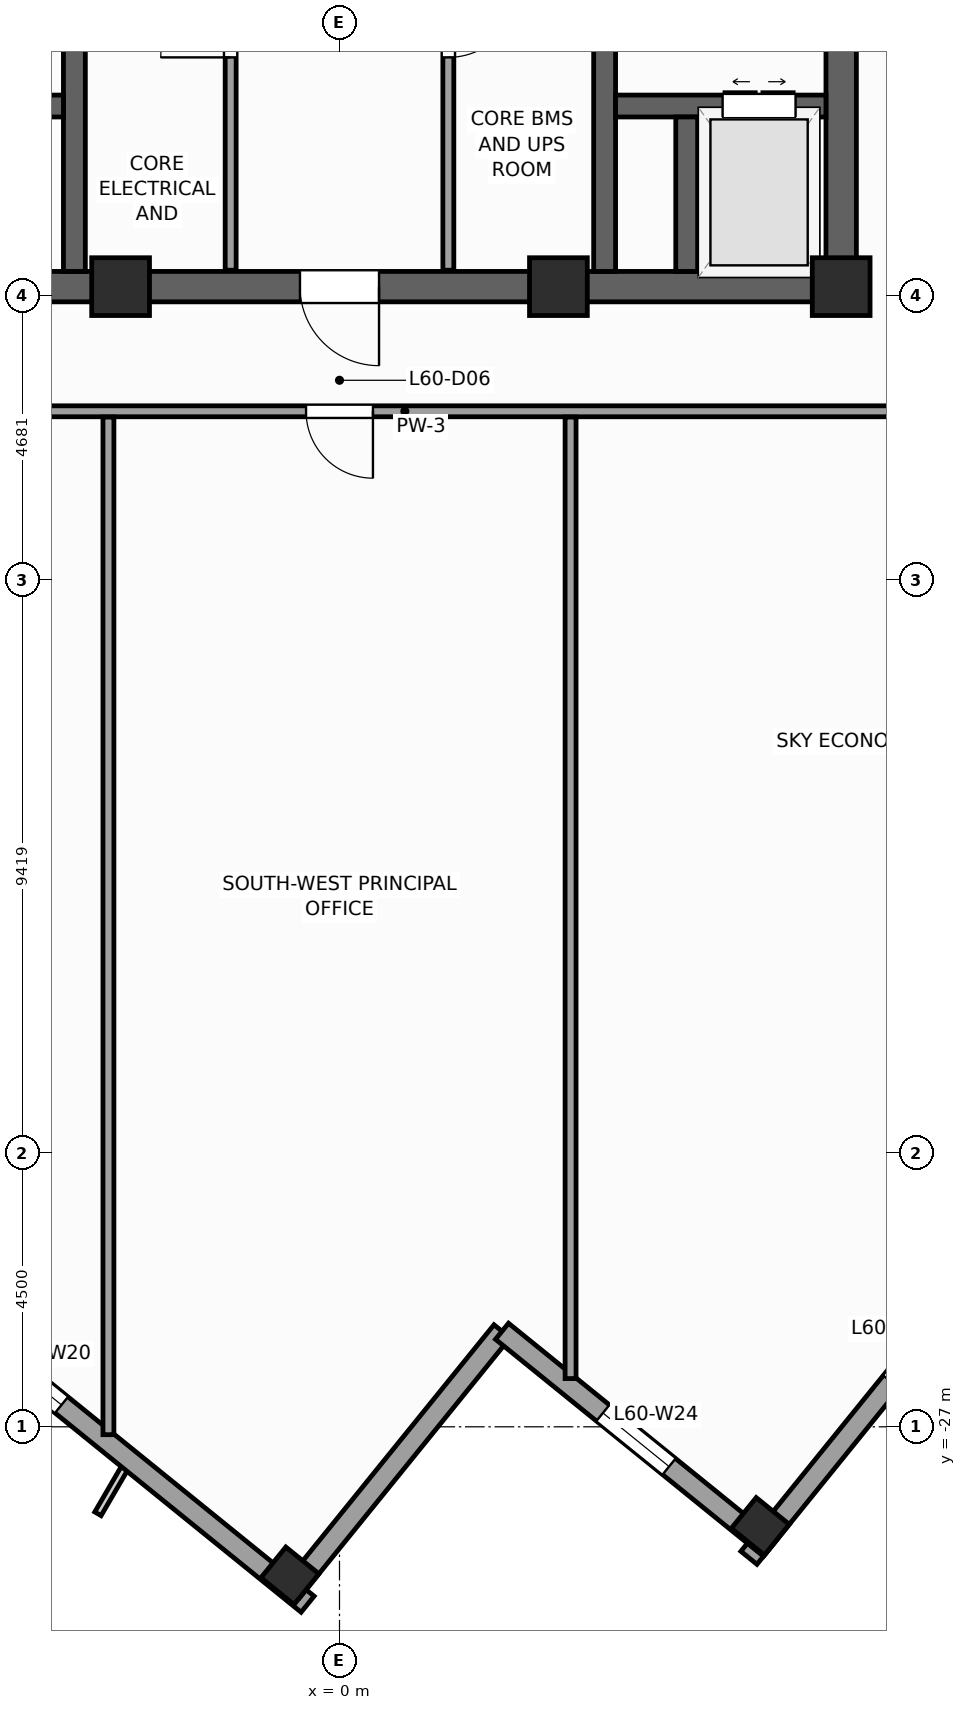
"""IFC4 building model, lengths in metres.
Left out: names, types, materials, properties, quantities, classifications, styles, units other than length and angle.
Written with IfcOpenShell. Run it as: python <this file> out.ifc"""

import sys

from ifc_helpers import new_model, si_unit, direction, frame, frame_2d, origin, origin_2d, place, context, subcontext, project, spatial, rectangle, extrude, source, transform, mapped, element, fill, save


model = new_model("IFC4")
c1 = context("Model", 3, precision=1e-05, world=origin(), true_north=direction((0.0, 1.0)))
c2 = subcontext(c1, "Body", "Model", "MODEL_VIEW")
j1 = project(units=[si_unit("LENGTHUNIT", "METRE"), si_unit("PLANEANGLEUNIT", "RADIAN")], contexts=[c1])
p1 = place(None, origin())
s1 = spatial("IfcSite", under=j1, at=p1, CompositionType="ELEMENT")
p2 = place(p1, origin())
s2 = spatial("IfcBuilding", under=s1, at=p2, CompositionType="ELEMENT")
p3 = place(p2, frame((0.0, 0.0, 248.5)))
s3 = spatial("IfcBuildingStorey", under=s2, at=p3, CompositionType="ELEMENT", Elevation=248.5)
p4 = place(p3, frame((-8.5, -8.25, 0.0), z_axis=(0.0, 0.0, 1.0), x_axis=(1.0, 0.0, 0.0)))
e1 = element("IfcWall", 1, at=p4, inside=s3, PredefinedType="SHEAR", context=c2, shape_type="SweptSolid", body=[
    extrude(rectangle(XDim=17.0, YDim=0.5, at=frame_2d((8.5, 0.0))), origin(), (0.0, 0.0, 1.0), 3.9),
])
p5 = place(p4, frame((7.85, 0.0, 0.0)))
e2 = element("IfcOpeningElement", 2, at=p5, cuts=e1, PredefinedType="OPENING", context=c2, shape_type="SweptSolid", body=[
    extrude(rectangle(XDim=1.3, YDim=2.2, at=frame_2d((0.65, 1.1))), frame((0.0, 0.26, 0.0), z_axis=(0.0, -1.0, 0.0), x_axis=(1.0, 0.0, 0.0)), (0.0, 0.0, 1.0), 0.52),
])
p6 = place(p3, frame((8.25, -8.0, 0.0), z_axis=(0.0, 0.0, 1.0), x_axis=(0.0, 1.0, 0.0)))
e3 = element("IfcWall", 3, at=p6, inside=s3, PredefinedType="SHEAR", context=c2, shape_type="SweptSolid", body=[
    extrude(rectangle(XDim=16.0, YDim=0.5, at=frame_2d((8.0, 0.0))), origin(), (0.0, 0.0, 1.0), 3.9),
])
p7 = place(p6, frame((4.69, 0.0, 0.0)))
e4 = element("IfcOpeningElement", 4, at=p7, cuts=e3, PredefinedType="OPENING", context=c2, shape_type="SweptSolid", body=[
    extrude(rectangle(XDim=1.3, YDim=2.2, at=frame_2d((0.65, 1.1))), frame((0.0, 0.26, 0.0), z_axis=(0.0, -1.0, 0.0), x_axis=(1.0, 0.0, 0.0)), (0.0, 0.0, 1.0), 0.52),
])
for number, where, z_axis, x_axis in (
    (5, (-4.36, -8.0, 0.0), (0.0, 0.0, 1.0), (0.0, 1.0, 0.0)),
    (6, (4.36, -8.0, 0.0), (0.0, 0.0, 1.0), (0.0, 1.0, 0.0)),
):
    element("IfcWall", number, at=place(p3, frame(where, z_axis=z_axis, x_axis=x_axis)), inside=s3, PredefinedType="SHEAR", context=c2, shape_type="SweptSolid", body=[
        extrude(rectangle(XDim=16.0, YDim=0.36, at=frame_2d((8.0, 0.0))), origin(), (0.0, 0.0, 1.0), 3.9),
    ])
p8 = place(p3, frame((-8.0, -5.28, 0.0), z_axis=(0.0, 0.0, 1.0), x_axis=(1.0, 0.0, 0.0)))
e7 = element("IfcWall", 7, at=p8, inside=s3, PredefinedType="SHEAR", context=c2, shape_type="SweptSolid", body=[
    extrude(rectangle(XDim=3.46, YDim=0.36, at=frame_2d((1.73, 0.0))), origin(), (0.0, 0.0, 1.0), 3.9),
])
p9 = place(p8, frame((0.5, 0.0, 0.0)))
e8 = element("IfcOpeningElement", 8, at=p9, cuts=e7, PredefinedType="OPENING", context=c2, shape_type="SweptSolid", body=[
    extrude(rectangle(XDim=1.2, YDim=2.25, at=frame_2d((0.6, 1.125))), frame((0.0, 0.19, 0.0), z_axis=(0.0, -1.0, 0.0), x_axis=(1.0, 0.0, 0.0)), (0.0, 0.0, 1.0), 0.38),
])
p10 = place(p3, frame((4.54, -5.28, 0.0), z_axis=(0.0, 0.0, 1.0), x_axis=(1.0, 0.0, 0.0)))
e9 = element("IfcWall", 9, at=p10, inside=s3, PredefinedType="SHEAR", context=c2, shape_type="SweptSolid", body=[
    extrude(rectangle(XDim=3.46, YDim=0.36, at=frame_2d((1.73, 0.0))), origin(), (0.0, 0.0, 1.0), 3.9),
])
p11 = place(p10, frame((1.76, 0.0, 0.0)))
e10 = element("IfcOpeningElement", 10, at=p11, cuts=e9, PredefinedType="OPENING", context=c2, shape_type="SweptSolid", body=[
    extrude(rectangle(XDim=1.2, YDim=2.25, at=frame_2d((0.6, 1.125))), frame((0.0, 0.19, 0.0), z_axis=(0.0, -1.0, 0.0), x_axis=(1.0, 0.0, 0.0)), (0.0, 0.0, 1.0), 0.38),
])
p12 = place(p3, frame((5.71, -8.0, 0.0), z_axis=(0.0, 0.0, 1.0), x_axis=(0.0, 1.0, 0.0)))
e11 = element("IfcWall", 11, at=p12, inside=s3, PredefinedType="SHEAR", context=c2, shape_type="SweptSolid", body=[
    extrude(rectangle(XDim=2.54, YDim=0.36, at=frame_2d((1.27, 0.0))), origin(), (0.0, 0.0, 1.0), 3.9),
])
m1 = source(origin(), c2, "Body", "SweptSolid", [
    extrude(rectangle(XDim=0.95, YDim=0.95, at=origin_2d()), origin(), (0.0, 0.0, 1.0), 3.9),
])
for number, where, z_axis, x_axis in (
    (12, (8.25, -8.25, 0.0), (0.0, 0.0, 1.0), (1.0, 0.0, 0.0)),
    (13, (-3.6, -8.25, 0.0), (0.0, 0.0, 1.0), (1.0, 0.0, 0.0)),
    (14, (3.6, -8.25, 0.0), (0.0, 0.0, 1.0), (1.0, 0.0, 0.0)),
):
    element("IfcColumn", number, at=place(p3, frame(where, z_axis=z_axis, x_axis=x_axis)), inside=s3, PredefinedType="PILASTER", context=c2, shape_type="MappedRepresentation", body=[
        mapped(m1, transform((0.0, 0.0, 0.0), scale=1.0)),
    ])
m2 = source(origin(), c2, "Body", "SweptSolid", [
    extrude(rectangle(XDim=0.65, YDim=0.7, at=origin_2d()), origin(), (0.0, 0.0, 1.0), 3.9),
])
for number, where, z_axis, x_axis in (
    (15, (6.92, -28.637, 0.0), (0.0, 0.0, 1.0), (0.629, 0.777, 0.0)),
    (16, (-0.815, -29.45, 0.0), (0.0, 0.0, 1.0), (0.629, 0.777, 0.0)),
):
    element("IfcColumn", number, at=place(p3, frame(where, z_axis=z_axis, x_axis=x_axis)), inside=s3, PredefinedType="COLUMN", context=c2, shape_type="MappedRepresentation", body=[
        mapped(m2, transform((0.0, 0.0, 0.0), scale=1.0)),
    ])
p13 = place(p3, frame((6.733, -29.154, 0.0), z_axis=(0.0, 0.0, 1.0), x_axis=(0.629325378072, 0.77714192302, 0.0)))
e17 = element("IfcWall", 17, at=p13, inside=s3, PredefinedType="STANDARD", context=c2, shape_type="SweptSolid", body=[
    extrude(rectangle(XDim=36.84, YDim=0.34, at=frame_2d((18.42, 0.0))), origin(), (0.0, 0.0, 1.0), 2.96),
])
p14 = place(p13, frame((12.295, 0.0, 0.0)))
e18 = element("IfcOpeningElement", 18, at=p14, cuts=e17, PredefinedType="OPENING", context=c2, shape_type="SweptSolid", body=[
    extrude(rectangle(XDim=1.05, YDim=2.25, at=frame_2d((0.525, 1.125))), frame((0.0, 0.18, 0.0), z_axis=(0.0, -1.0, 0.0), x_axis=(1.0, 0.0, 0.0)), (0.0, 0.0, 1.0), 0.36),
])
p15 = place(p13, frame((3.721, 0.0, 0.48)))
e19 = element("IfcOpeningElement", 19, at=p15, cuts=e17, PredefinedType="OPENING", context=c2, shape_type="SweptSolid", body=[
    extrude(rectangle(XDim=1.4, YDim=2.4, at=frame_2d((0.7, 1.2))), frame((0.0, 0.18, 0.0), z_axis=(0.0, -1.0, 0.0), x_axis=(1.0, 0.0, 0.0)), (0.0, 0.0, 1.0), 0.36),
])
p16 = place(p13, frame((9.059, 0.0, 0.58)))
e20 = element("IfcOpeningElement", 20, at=p16, cuts=e17, PredefinedType="OPENING", context=c2, shape_type="SweptSolid", body=[
    extrude(rectangle(XDim=1.75, YDim=2.3, at=frame_2d((0.875, 1.15))), frame((0.0, 0.18, 0.0), z_axis=(0.0, -1.0, 0.0), x_axis=(1.0, 0.0, 0.0)), (0.0, 0.0, 1.0), 0.36),
])
p17 = place(p13, frame((16.058, 0.0, 0.58)))
e21 = element("IfcOpeningElement", 21, at=p17, cuts=e17, PredefinedType="OPENING", context=c2, shape_type="SweptSolid", body=[
    extrude(rectangle(XDim=1.75, YDim=2.3, at=frame_2d((0.875, 1.15))), frame((0.0, 0.18, 0.0), z_axis=(0.0, -1.0, 0.0), x_axis=(1.0, 0.0, 0.0)), (0.0, 0.0, 1.0), 0.36),
])
p18 = place(p13, frame((24.176, 0.0, 0.58)))
e22 = element("IfcOpeningElement", 22, at=p18, cuts=e17, PredefinedType="OPENING", context=c2, shape_type="SweptSolid", body=[
    extrude(rectangle(XDim=1.75, YDim=2.3, at=frame_2d((0.875, 1.15))), frame((0.0, 0.18, 0.0), z_axis=(0.0, -1.0, 0.0), x_axis=(1.0, 0.0, 0.0)), (0.0, 0.0, 1.0), 0.36),
])
p19 = place(p13, frame((30.982, 0.0, 0.48)))
e23 = element("IfcOpeningElement", 23, at=p19, cuts=e17, PredefinedType="OPENING", context=c2, shape_type="SweptSolid", body=[
    extrude(rectangle(XDim=1.4, YDim=2.4, at=frame_2d((0.7, 1.2))), frame((0.0, 0.18, 0.0), z_axis=(0.0, -1.0, 0.0), x_axis=(1.0, 0.0, 0.0)), (0.0, 0.0, 1.0), 0.36),
])
p20 = place(p3, frame((-29.154, -6.733, 0.0), z_axis=(0.0, 0.0, 1.0), x_axis=(0.77714192302, -0.629325378072, 0.0)))
e24 = element("IfcWall", 24, at=p20, inside=s3, PredefinedType="STANDARD", context=c2, shape_type="SweptSolid", body=[
    extrude(rectangle(XDim=36.84, YDim=0.34, at=frame_2d((18.42, 0.0))), origin(), (0.0, 0.0, 1.0), 2.96),
])
p21 = place(p20, frame((3.721, 0.0, 0.48)))
e25 = element("IfcOpeningElement", 25, at=p21, cuts=e24, PredefinedType="OPENING", context=c2, shape_type="SweptSolid", body=[
    extrude(rectangle(XDim=1.4, YDim=2.4, at=frame_2d((0.7, 1.2))), frame((0.0, 0.18, 0.0), z_axis=(0.0, -1.0, 0.0), x_axis=(1.0, 0.0, 0.0)), (0.0, 0.0, 1.0), 0.36),
])
p22 = place(p20, frame((9.809, 0.0, 0.58)))
e26 = element("IfcOpeningElement", 26, at=p22, cuts=e24, PredefinedType="OPENING", context=c2, shape_type="SweptSolid", body=[
    extrude(rectangle(XDim=1.75, YDim=2.3, at=frame_2d((0.875, 1.15))), frame((0.0, 0.18, 0.0), z_axis=(0.0, -1.0, 0.0), x_axis=(1.0, 0.0, 0.0)), (0.0, 0.0, 1.0), 0.36),
])
p23 = place(p20, frame((16.058, 0.0, 0.58)))
e27 = element("IfcOpeningElement", 27, at=p23, cuts=e24, PredefinedType="OPENING", context=c2, shape_type="SweptSolid", body=[
    extrude(rectangle(XDim=1.75, YDim=2.3, at=frame_2d((0.875, 1.15))), frame((0.0, 0.18, 0.0), z_axis=(0.0, -1.0, 0.0), x_axis=(1.0, 0.0, 0.0)), (0.0, 0.0, 1.0), 0.36),
])
p24 = place(p20, frame((24.176, 0.0, 0.58)))
e28 = element("IfcOpeningElement", 28, at=p24, cuts=e24, PredefinedType="OPENING", context=c2, shape_type="SweptSolid", body=[
    extrude(rectangle(XDim=1.75, YDim=2.3, at=frame_2d((0.875, 1.15))), frame((0.0, 0.18, 0.0), z_axis=(0.0, -1.0, 0.0), x_axis=(1.0, 0.0, 0.0)), (0.0, 0.0, 1.0), 0.36),
])
p25 = place(p20, frame((30.232, 0.0, 0.48)))
e29 = element("IfcOpeningElement", 29, at=p25, cuts=e24, PredefinedType="OPENING", context=c2, shape_type="SweptSolid", body=[
    extrude(rectangle(XDim=1.4, YDim=2.4, at=frame_2d((0.7, 1.2))), frame((0.0, 0.18, 0.0), z_axis=(0.0, -1.0, 0.0), x_axis=(1.0, 0.0, 0.0)), (0.0, 0.0, 1.0), 0.36),
])
p26 = place(p3, frame((-0.789, -29.703, 0.0), z_axis=(0.0, 0.0, 1.0), x_axis=(0.629323365087, 0.77714355312, 0.0)))
e30 = element("IfcWall", 30, at=p26, inside=s3, PredefinedType="STANDARD", context=c2, shape_type="SweptSolid", body=[
    extrude(rectangle(XDim=5.5, YDim=0.34, at=frame_2d((2.75, 0.0))), origin(), (0.0, 0.0, 1.0), 3.66),
])
p27 = place(p3, frame((2.673, -25.429, 0.0), z_axis=(0.0, 0.0, 1.0), x_axis=(0.777162640055, -0.629299794138, 0.0)))
e31 = element("IfcWall", 31, at=p27, inside=s3, PredefinedType="STANDARD", context=c2, shape_type="SweptSolid", body=[
    extrude(rectangle(XDim=5.67, YDim=0.34, at=frame_2d((2.835, 0.0))), origin(), (0.0, 0.0, 1.0), 3.66),
])
p28 = place(p27, frame((2.135, 0.0, 0.48)))
e32 = element("IfcOpeningElement", 32, at=p28, cuts=e31, PredefinedType="OPENING", context=c2, shape_type="SweptSolid", body=[
    extrude(rectangle(XDim=1.4, YDim=2.4, at=frame_2d((0.7, 1.2))), frame((0.0, 0.18, 0.0), z_axis=(0.0, -1.0, 0.0), x_axis=(1.0, 0.0, 0.0)), (0.0, 0.0, 1.0), 0.36),
])
p29 = place(p3, frame((-1.79, -7.98, 0.0), z_axis=(0.0, 0.0, 1.0), x_axis=(0.0, 1.0, 0.0)))
e33 = element("IfcWall", 33, at=p29, inside=s3, PredefinedType="PARTITIONING", context=c2, shape_type="SweptSolid", body=[
    extrude(rectangle(XDim=12.38, YDim=0.18, at=frame_2d((6.19, 0.0))), origin(), (0.0, 0.0, 1.0), 3.66),
])
p30 = place(p29, frame((8.8, 0.0, 0.0)))
e34 = element("IfcOpeningElement", 34, at=p30, cuts=e33, PredefinedType="OPENING", context=c2, shape_type="SweptSolid", body=[
    extrude(rectangle(XDim=1.1, YDim=2.2, at=frame_2d((0.55, 1.1))), frame((0.0, 0.1, 0.0), z_axis=(0.0, -1.0, 0.0), x_axis=(1.0, 0.0, 0.0)), (0.0, 0.0, 1.0), 0.2),
])
p31 = place(p29, frame((10.86, 0.0, 0.0)))
e35 = element("IfcOpeningElement", 35, at=p31, cuts=e33, PredefinedType="OPENING", context=c2, shape_type="SweptSolid", body=[
    extrude(rectangle(XDim=1.1, YDim=2.2, at=frame_2d((0.55, 1.1))), frame((0.0, 0.1, 0.0), z_axis=(0.0, -1.0, 0.0), x_axis=(1.0, 0.0, 0.0)), (0.0, 0.0, 1.0), 0.2),
])
p32 = place(p29, frame((3.5, 0.0, 0.0)))
e36 = element("IfcOpeningElement", 36, at=p32, cuts=e33, PredefinedType="OPENING", context=c2, shape_type="SweptSolid", body=[
    extrude(rectangle(XDim=1.15, YDim=2.25, at=frame_2d((0.575, 1.125))), frame((0.0, 0.1, 0.0), z_axis=(0.0, -1.0, 0.0), x_axis=(1.0, 0.0, 0.0)), (0.0, 0.0, 1.0), 0.2),
])
p33 = place(p3, frame((1.79, -7.98, 0.0), z_axis=(0.0, 0.0, 1.0), x_axis=(0.0, 1.0, 0.0)))
e37 = element("IfcWall", 37, at=p33, inside=s3, PredefinedType="PARTITIONING", context=c2, shape_type="SweptSolid", body=[
    extrude(rectangle(XDim=12.38, YDim=0.18, at=frame_2d((6.19, 0.0))), origin(), (0.0, 0.0, 1.0), 3.66),
])
p34 = place(p33, frame((8.8, 0.0, 0.0)))
e38 = element("IfcOpeningElement", 38, at=p34, cuts=e37, PredefinedType="OPENING", context=c2, shape_type="SweptSolid", body=[
    extrude(rectangle(XDim=1.1, YDim=2.2, at=frame_2d((0.55, 1.1))), frame((0.0, 0.1, 0.0), z_axis=(0.0, -1.0, 0.0), x_axis=(1.0, 0.0, 0.0)), (0.0, 0.0, 1.0), 0.2),
])
p35 = place(p33, frame((10.86, 0.0, 0.0)))
e39 = element("IfcOpeningElement", 39, at=p35, cuts=e37, PredefinedType="OPENING", context=c2, shape_type="SweptSolid", body=[
    extrude(rectangle(XDim=1.1, YDim=2.2, at=frame_2d((0.55, 1.1))), frame((0.0, 0.1, 0.0), z_axis=(0.0, -1.0, 0.0), x_axis=(1.0, 0.0, 0.0)), (0.0, 0.0, 1.0), 0.2),
])
p36 = place(p33, frame((3.5, 0.0, 0.0)))
e40 = element("IfcOpeningElement", 40, at=p36, cuts=e37, PredefinedType="OPENING", context=c2, shape_type="SweptSolid", body=[
    extrude(rectangle(XDim=1.15, YDim=2.25, at=frame_2d((0.575, 1.125))), frame((0.0, 0.1, 0.0), z_axis=(0.0, -1.0, 0.0), x_axis=(1.0, 0.0, 0.0)), (0.0, 0.0, 1.0), 0.2),
])
p37 = place(p3, frame((-10.3, -10.3, 0.0), z_axis=(0.0, 0.0, 1.0), x_axis=(1.0, 0.0, 0.0)))
e41 = element("IfcWall", 41, at=p37, inside=s3, PredefinedType="PARTITIONING", context=c2, shape_type="SweptSolid", body=[
    extrude(rectangle(XDim=22.75, YDim=0.18, at=frame_2d((11.375, 0.0))), origin(), (0.0, 0.0, 1.0), 3.66),
])
p38 = place(p37, frame((9.75, 0.0, 0.0)))
e42 = element("IfcOpeningElement", 42, at=p38, cuts=e41, PredefinedType="OPENING", context=c2, shape_type="SweptSolid", body=[
    extrude(rectangle(XDim=1.1, YDim=2.2, at=frame_2d((0.55, 1.1))), frame((0.0, 0.1, 0.0), z_axis=(0.0, -1.0, 0.0), x_axis=(1.0, 0.0, 0.0)), (0.0, 0.0, 1.0), 0.2),
])
p39 = place(p37, frame((2.865, 0.0, 0.0)))
e43 = element("IfcOpeningElement", 43, at=p39, cuts=e41, PredefinedType="OPENING", context=c2, shape_type="SweptSolid", body=[
    extrude(rectangle(XDim=1.1, YDim=2.2, at=frame_2d((0.55, 1.1))), frame((0.0, 0.1, 0.0), z_axis=(0.0, -1.0, 0.0), x_axis=(1.0, 0.0, 0.0)), (0.0, 0.0, 1.0), 0.2),
])
p40 = place(p3, frame((3.8, -10.395, 0.0), z_axis=(0.0, 0.0, 1.0), x_axis=(0.0, -1.0, 0.0)))
e44 = element("IfcWall", 44, at=p40, inside=s3, PredefinedType="PARTITIONING", context=c2, shape_type="SweptSolid", body=[
    extrude(rectangle(XDim=15.812, YDim=0.18, at=frame_2d((7.906, 0.0))), origin(), (0.0, 0.0, 1.0), 3.66),
])
p41 = place(p3, frame((-3.8, -10.395, 0.0), z_axis=(0.0, 0.0, 1.0), x_axis=(0.0, -1.0, 0.0)))
e45 = element("IfcWall", 45, at=p41, inside=s3, PredefinedType="PARTITIONING", context=c2, shape_type="SweptSolid", body=[
    extrude(rectangle(XDim=16.734, YDim=0.18, at=frame_2d((8.367, 0.0))), origin(), (0.0, 0.0, 1.0), 3.66),
])
m3 = source(origin(), c2, "Body", "SweptSolid", [
    extrude(rectangle(XDim=1.4, YDim=2.4, at=frame_2d((0.7, 1.2))), frame((0.0, 0.03, 0.0), z_axis=(0.0, -1.0, 0.0), x_axis=(1.0, 0.0, 0.0)), (0.0, 0.0, 1.0), 0.06),
])
p42 = place(p25, origin())
e46 = element("IfcWindow", 46, at=p42, inside=s3, PartitioningType="SINGLE_PANEL", PredefinedType="WINDOW", context=c2, shape_type="MappedRepresentation", body=[
    mapped(m3, transform((0.0, 0.0, 0.0), scale=1.0)),
])
fill(e29, e46)
p43 = place(p28, origin())
e47 = element("IfcWindow", 47, at=p43, inside=s3, PartitioningType="SINGLE_PANEL", PredefinedType="WINDOW", context=c2, shape_type="MappedRepresentation", body=[
    mapped(m3, transform((0.0, 0.0, 0.0), scale=1.0)),
])
fill(e32, e47)
m4 = source(origin(), c2, "Body", "SweptSolid", [
    extrude(rectangle(XDim=1.3, YDim=2.2, at=frame_2d((0.65, 1.1))), frame((0.0, 0.025, 0.0), z_axis=(0.0, -1.0, 0.0), x_axis=(1.0, 0.0, 0.0)), (0.0, 0.0, 1.0), 0.05),
])
p44 = place(p5, frame((1.3, 0.0, 0.0), z_axis=(0.0, 0.0, 1.0), x_axis=(-1.0, 0.0, 0.0)))
e48 = element("IfcDoor", 48, at=p44, inside=s3, OperationType="SINGLE_SWING_RIGHT", PredefinedType="DOOR", context=c2, shape_type="MappedRepresentation", body=[
    mapped(m4, transform((0.0, 0.0, 0.0), scale=1.0)),
])
fill(e2, e48)
m5 = source(origin(), c2, "Body", "SweptSolid", [
    extrude(rectangle(XDim=1.2, YDim=2.25, at=frame_2d((0.6, 1.125))), frame((0.0, 0.025, 0.0), z_axis=(0.0, -1.0, 0.0), x_axis=(1.0, 0.0, 0.0)), (0.0, 0.0, 1.0), 0.05),
])
p45 = place(p11, origin())
e49 = element("IfcDoor", 49, at=p45, inside=s3, OperationType="DOUBLE_DOOR_SLIDING", PredefinedType="DOOR", context=c2, shape_type="MappedRepresentation", body=[
    mapped(m5, transform((0.0, 0.0, 0.0), scale=1.0)),
])
fill(e10, e49)
m6 = source(origin(), c2, "Body", "SweptSolid", [
    extrude(rectangle(XDim=1.15, YDim=2.25, at=frame_2d((0.575, 1.125))), frame((0.0, 0.025, 0.0), z_axis=(0.0, -1.0, 0.0), x_axis=(1.0, 0.0, 0.0)), (0.0, 0.0, 1.0), 0.05),
])
p46 = place(p32, origin())
e50 = element("IfcDoor", 50, at=p46, inside=s3, OperationType="SINGLE_SWING_LEFT", PredefinedType="DOOR", context=c2, shape_type="MappedRepresentation", body=[
    mapped(m6, transform((0.0, 0.0, 0.0), scale=1.0)),
])
fill(e36, e50)
p47 = place(p36, frame((1.15, 0.0, 0.0), z_axis=(0.0, 0.0, 1.0), x_axis=(-1.0, 0.0, 0.0)))
e51 = element("IfcDoor", 51, at=p47, inside=s3, OperationType="SINGLE_SWING_RIGHT", PredefinedType="DOOR", context=c2, shape_type="MappedRepresentation", body=[
    mapped(m6, transform((0.0, 0.0, 0.0), scale=1.0)),
])
fill(e40, e51)
m7 = source(origin(), c2, "Body", "SweptSolid", [
    extrude(rectangle(XDim=1.1, YDim=2.2, at=frame_2d((0.55, 1.1))), frame((0.0, 0.025, 0.0), z_axis=(0.0, -1.0, 0.0), x_axis=(1.0, 0.0, 0.0)), (0.0, 0.0, 1.0), 0.05),
])
p48 = place(p38, frame((1.1, 0.0, 0.0), z_axis=(0.0, 0.0, 1.0), x_axis=(-1.0, 0.0, 0.0)))
e52 = element("IfcDoor", 52, at=p48, inside=s3, OperationType="SINGLE_SWING_RIGHT", PredefinedType="DOOR", context=c2, shape_type="MappedRepresentation", body=[
    mapped(m7, transform((0.0, 0.0, 0.0), scale=1.0)),
])
fill(e42, e52)
save(model, sys.argv[1])
